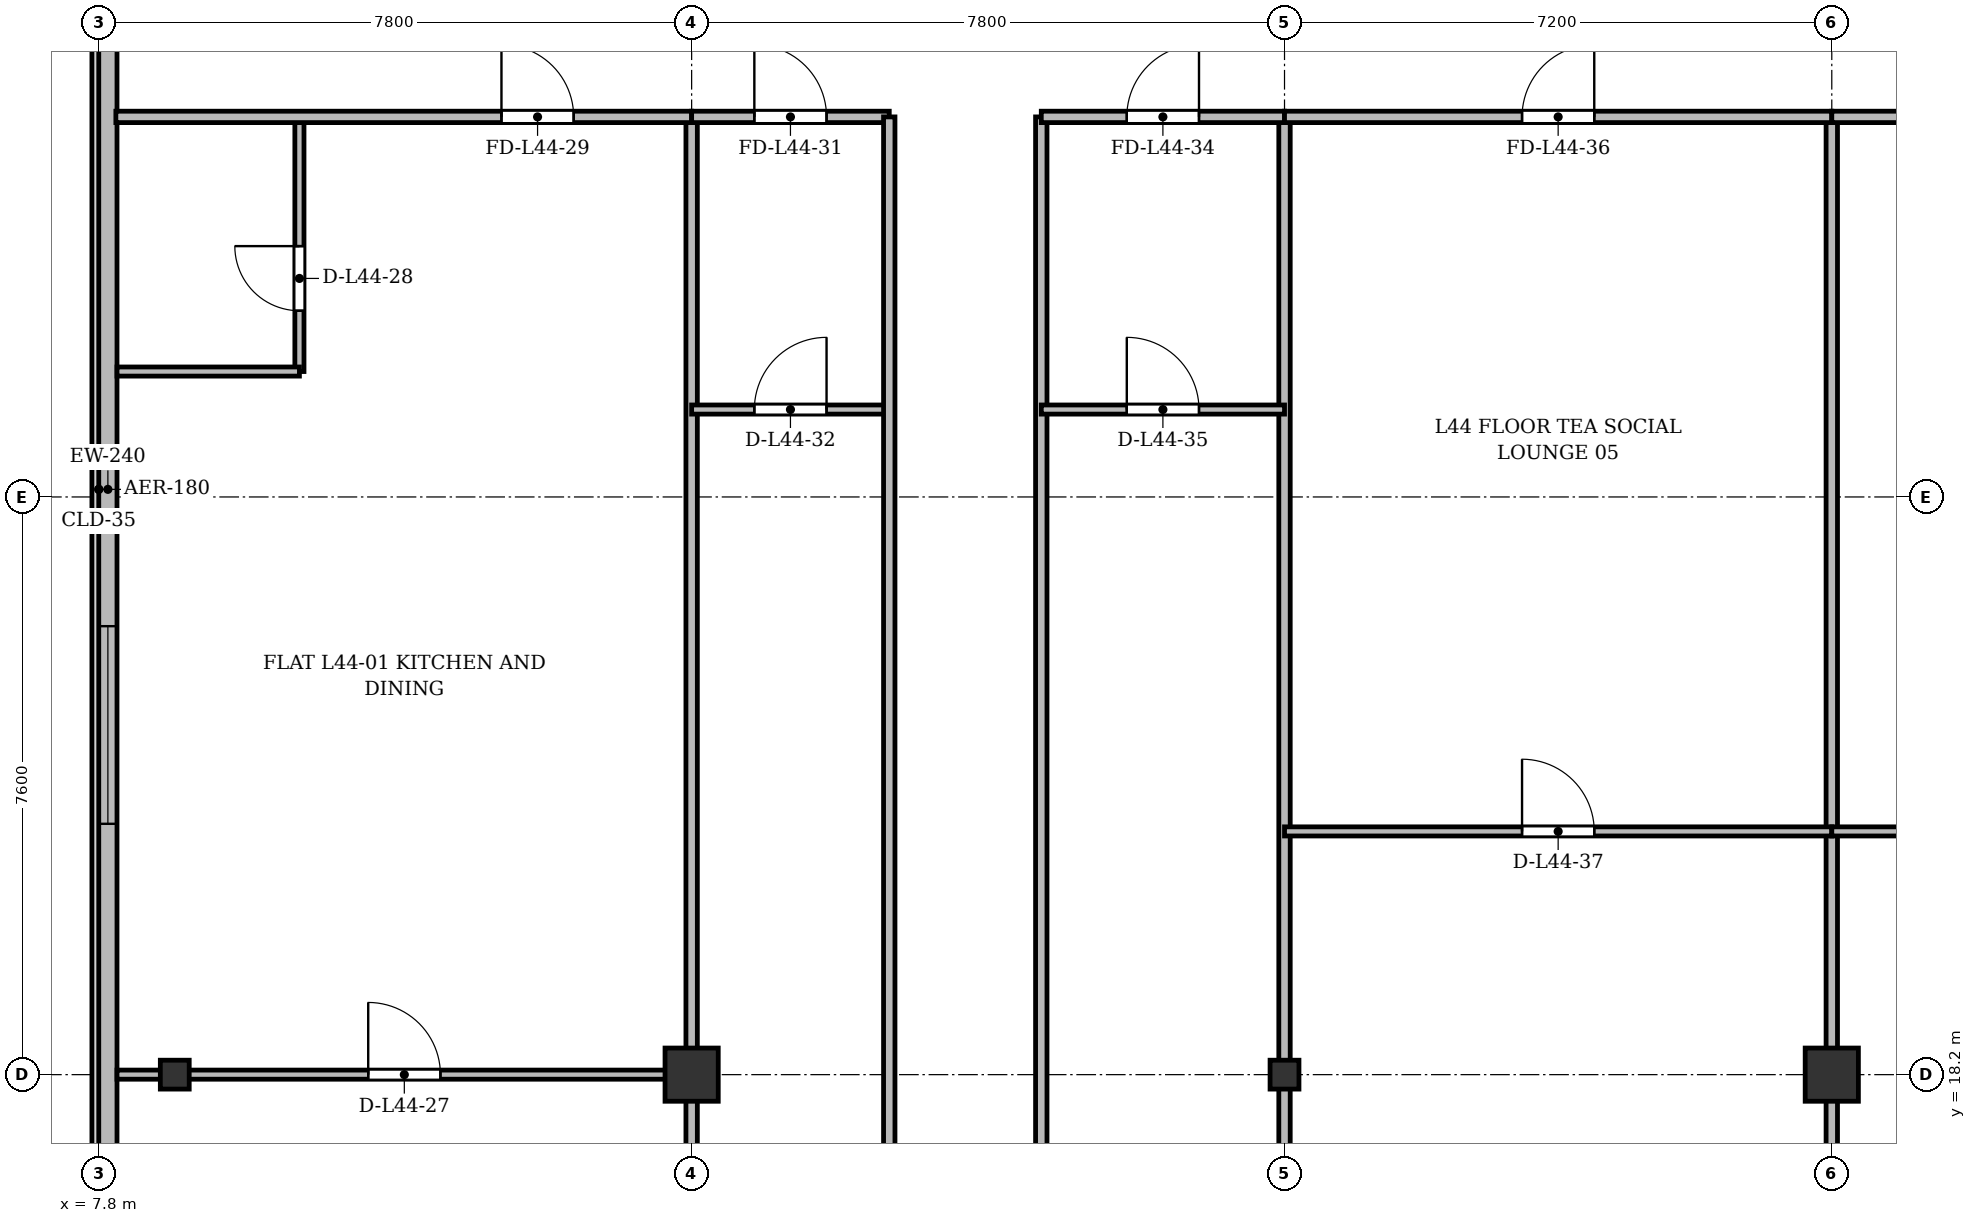
"""IFC4 building model, lengths in metres.
Left out: names, types, materials, properties, quantities, classifications, styles, units other than length and angle.
Written with IfcOpenShell. Run it as: python <this file> out.ifc"""

import sys

from ifc_helpers import new_model, si_unit, direction, frame, frame_2d, origin, origin_2d, place, context, subcontext, project, spatial, rectangle, i_section, extrude, source, transform, mapped, element, fill, save


model = new_model("IFC4")
c1 = context("Model", 3, precision=1e-05, world=origin(), true_north=direction((0.0, 1.0)))
c2 = subcontext(c1, "Body", "Model", "MODEL_VIEW")
j1 = project(units=[si_unit("LENGTHUNIT", "METRE"), si_unit("PLANEANGLEUNIT", "RADIAN")], contexts=[c1])
p1 = place(None, origin())
s1 = spatial("IfcSite", under=j1, at=p1, CompositionType="ELEMENT")
p2 = place(p1, origin())
s2 = spatial("IfcBuilding", under=s1, at=p2, CompositionType="ELEMENT")
p3 = place(p2, frame((0.0, 0.0, 168.1)))
s3 = spatial("IfcBuildingStorey", under=s2, at=p3, CompositionType="ELEMENT", Elevation=168.1)
m1 = source(origin(), c2, "Body", "SweptSolid", [
    extrude(i_section(OverallWidth=0.38, OverallDepth=0.38, WebThickness=0.02, FlangeThickness=0.03, at=origin_2d()), origin(), (0.0, 0.0, 1.0), 3.6),
])
p4 = place(p3, frame((8.8, 18.2, 0.0), z_axis=(0.0, 0.0, 1.0), x_axis=(1.0, 0.0, 0.0)))
e1 = element("IfcColumn", 1, at=p4, inside=s3, PredefinedType="COLUMN", context=c2, shape_type="MappedRepresentation", body=[
    mapped(m1, transform((0.0, 0.0, 0.0), x_axis=(1.0, 0.0, 0.0), y_axis=(0.0, 1.0, 0.0), z_axis=(0.0, 0.0, 1.0), scale=1.0)),
])
m2 = source(origin(), c2, "Body", "SweptSolid", [
    extrude(rectangle(XDim=0.7, YDim=0.7, at=origin_2d()), origin(), (0.0, 0.0, 1.0), 3.6),
])
p5 = place(p3, frame((15.6, 18.2, 0.0), z_axis=(0.0, 0.0, 1.0), x_axis=(1.0, 0.0, 0.0)))
e2 = element("IfcColumn", 2, at=p5, inside=s3, PredefinedType="COLUMN", context=c2, shape_type="MappedRepresentation", body=[
    mapped(m2, transform((0.0, 0.0, 0.0), x_axis=(1.0, 0.0, 0.0), y_axis=(0.0, 1.0, 0.0), z_axis=(0.0, 0.0, 1.0), scale=1.0)),
])
p6 = place(p3, frame((23.4, 18.2, 0.0), z_axis=(0.0, 0.0, 1.0), x_axis=(1.0, 0.0, 0.0)))
e3 = element("IfcColumn", 3, at=p6, inside=s3, PredefinedType="COLUMN", context=c2, shape_type="MappedRepresentation", body=[
    mapped(m1, transform((0.0, 0.0, 0.0), x_axis=(1.0, 0.0, 0.0), y_axis=(0.0, 1.0, 0.0), z_axis=(0.0, 0.0, 1.0), scale=1.0)),
])
p7 = place(p3, frame((30.6, 18.2, 0.0), z_axis=(0.0, 0.0, 1.0), x_axis=(1.0, 0.0, 0.0)))
e4 = element("IfcColumn", 4, at=p7, inside=s3, PredefinedType="COLUMN", context=c2, shape_type="MappedRepresentation", body=[
    mapped(m2, transform((0.0, 0.0, 0.0), x_axis=(1.0, 0.0, 0.0), y_axis=(0.0, 1.0, 0.0), z_axis=(0.0, 0.0, 1.0), scale=1.0)),
])
p8 = place(p3, frame((7.92, 6.3, 0.0), z_axis=(0.0, 0.0, 1.0), x_axis=(0.0, 1.0, 0.0)))
e5 = element("IfcWall", 5, at=p8, inside=s3, PredefinedType="SOLIDWALL", context=c2, shape_type="SweptSolid", body=[
    extrude(rectangle(XDim=39.2, YDim=0.24, at=frame_2d((19.6, 0.0))), origin(), (0.0, 0.0, 1.0), 3.35),
])
p9 = place(p8, frame((1.45, 0.0, 0.92)))
e6 = element("IfcOpeningElement", 6, at=p9, cuts=e5, PredefinedType="OPENING", context=c2, shape_type="SweptSolid", body=[
    extrude(rectangle(XDim=1.2, YDim=1.65, at=frame_2d((0.6, 0.825))), frame((0.0, 0.13, 0.0), z_axis=(0.0, -1.0, 0.0), x_axis=(1.0, 0.0, 0.0)), (0.0, 0.0, 1.0), 0.26),
])
p10 = place(p8, frame((3.8, 0.0, 0.92)))
e7 = element("IfcOpeningElement", 7, at=p10, cuts=e5, PredefinedType="OPENING", context=c2, shape_type="SweptSolid", body=[
    extrude(rectangle(XDim=2.6, YDim=1.9, at=frame_2d((1.3, 0.95))), frame((0.0, 0.13, 0.0), z_axis=(0.0, -1.0, 0.0), x_axis=(1.0, 0.0, 0.0)), (0.0, 0.0, 1.0), 0.26),
])
p11 = place(p8, frame((8.0, 0.0, 0.92)))
e8 = element("IfcOpeningElement", 8, at=p11, cuts=e5, PredefinedType="OPENING", context=c2, shape_type="SweptSolid", body=[
    extrude(rectangle(XDim=2.6, YDim=1.9, at=frame_2d((1.3, 0.95))), frame((0.0, 0.13, 0.0), z_axis=(0.0, -1.0, 0.0), x_axis=(1.0, 0.0, 0.0)), (0.0, 0.0, 1.0), 0.26),
])
p12 = place(p8, frame((15.2, 0.0, 0.92)))
e9 = element("IfcOpeningElement", 9, at=p12, cuts=e5, PredefinedType="OPENING", context=c2, shape_type="SweptSolid", body=[
    extrude(rectangle(XDim=2.6, YDim=1.9, at=frame_2d((1.3, 0.95))), frame((0.0, 0.13, 0.0), z_axis=(0.0, -1.0, 0.0), x_axis=(1.0, 0.0, 0.0)), (0.0, 0.0, 1.0), 0.26),
])
p13 = place(p8, frame((29.2, 0.0, 0.92)))
e10 = element("IfcOpeningElement", 10, at=p13, cuts=e5, PredefinedType="OPENING", context=c2, shape_type="SweptSolid", body=[
    extrude(rectangle(XDim=2.6, YDim=1.9, at=frame_2d((1.3, 0.95))), frame((0.0, 0.13, 0.0), z_axis=(0.0, -1.0, 0.0), x_axis=(1.0, 0.0, 0.0)), (0.0, 0.0, 1.0), 0.26),
])
p14 = place(p8, frame((36.85, 0.0, 0.92)))
e11 = element("IfcOpeningElement", 11, at=p14, cuts=e5, PredefinedType="OPENING", context=c2, shape_type="SweptSolid", body=[
    extrude(rectangle(XDim=1.2, YDim=1.65, at=frame_2d((0.6, 0.825))), frame((0.0, 0.13, 0.0), z_axis=(0.0, -1.0, 0.0), x_axis=(1.0, 0.0, 0.0)), (0.0, 0.0, 1.0), 0.26),
])
for number, where, z_axis, x_axis in (
    (12, (15.6, 3.525, 0.0), (0.0, 0.0, 1.0), (0.0, 1.0, 0.0)),
    (13, (23.4, 3.525, 0.0), (0.0, 0.0, 1.0), (0.0, 1.0, 0.0)),
    (14, (30.6, 3.525, 0.0), (0.0, 0.0, 1.0), (0.0, 1.0, 0.0)),
):
    element("IfcWall", number, at=place(p3, frame(where, z_axis=z_axis, x_axis=x_axis)), inside=s3, PredefinedType="PARTITIONING", context=c2, shape_type="SweptSolid", body=[
        extrude(rectangle(XDim=27.275, YDim=0.15, at=frame_2d((13.638, 0.0))), origin(), (0.0, 0.0, 1.0), 2.85),
    ])
p15 = place(p3, frame((8.04, 18.2, 0.0), z_axis=(0.0, 0.0, 1.0), x_axis=(1.0, 0.0, 0.0)))
e15 = element("IfcWall", 15, at=p15, inside=s3, PredefinedType="PARTITIONING", context=c2, shape_type="SweptSolid", body=[
    extrude(rectangle(XDim=7.56, YDim=0.12, at=frame_2d((3.78, 0.0))), origin(), (0.0, 0.0, 1.0), 2.75),
])
p16 = place(p15, frame((3.305, 0.0, 0.0)))
e16 = element("IfcOpeningElement", 16, at=p16, cuts=e15, PredefinedType="OPENING", context=c2, shape_type="SweptSolid", body=[
    extrude(rectangle(XDim=0.95, YDim=2.15, at=frame_2d((0.475, 1.075))), frame((0.0, 0.07, 0.0), z_axis=(0.0, -1.0, 0.0), x_axis=(1.0, 0.0, 0.0)), (0.0, 0.0, 1.0), 0.14),
])
p17 = place(p3, frame((10.44, 27.45, 0.0), z_axis=(0.0, 0.0, 1.0), x_axis=(0.0, 1.0, 0.0)))
e17 = element("IfcWall", 17, at=p17, inside=s3, PredefinedType="PARTITIONING", context=c2, shape_type="SweptSolid", body=[
    extrude(rectangle(XDim=3.35, YDim=0.12, at=frame_2d((1.675, 0.0))), origin(), (0.0, 0.0, 1.0), 3.35),
])
p18 = place(p17, frame((0.8, 0.0, 0.0)))
e18 = element("IfcOpeningElement", 18, at=p18, cuts=e17, PredefinedType="OPENING", context=c2, shape_type="SweptSolid", body=[
    extrude(rectangle(XDim=0.85, YDim=2.1, at=frame_2d((0.425, 1.05))), frame((0.0, 0.07, 0.0), z_axis=(0.0, -1.0, 0.0), x_axis=(1.0, 0.0, 0.0)), (0.0, 0.0, 1.0), 0.14),
])
p19 = place(p3, frame((8.04, 27.45, 0.0), z_axis=(0.0, 0.0, 1.0), x_axis=(1.0, 0.0, 0.0)))
e19 = element("IfcWall", 19, at=p19, inside=s3, PredefinedType="PARTITIONING", context=c2, shape_type="SweptSolid", body=[
    extrude(rectangle(XDim=2.4, YDim=0.12, at=frame_2d((1.2, 0.0))), origin(), (0.0, 0.0, 1.0), 2.85),
])
p20 = place(p3, frame((8.025, 30.8, 0.0), z_axis=(0.0, 0.0, 1.0), x_axis=(1.0, 0.0, 0.0)))
e20 = element("IfcWall", 20, at=p20, inside=s3, PredefinedType="PARTITIONING", context=c2, shape_type="SweptSolid", body=[
    extrude(rectangle(XDim=7.575, YDim=0.15, at=frame_2d((3.788, 0.0))), origin(), (0.0, 0.0, 1.0), 2.85),
])
p21 = place(p20, frame((5.073, 0.0, 0.0)))
e21 = element("IfcOpeningElement", 21, at=p21, cuts=e20, PredefinedType="OPENING", context=c2, shape_type="SweptSolid", body=[
    extrude(rectangle(XDim=0.95, YDim=2.15, at=frame_2d((0.475, 1.075))), frame((0.0, 0.085, 0.0), z_axis=(0.0, -1.0, 0.0), x_axis=(1.0, 0.0, 0.0)), (0.0, 0.0, 1.0), 0.17),
])
p22 = place(p3, frame((15.6, 30.8, 0.0), z_axis=(0.0, 0.0, 1.0), x_axis=(1.0, 0.0, 0.0)))
e22 = element("IfcWall", 22, at=p22, inside=s3, PredefinedType="PARTITIONING", context=c2, shape_type="SweptSolid", body=[
    extrude(rectangle(XDim=2.6, YDim=0.15, at=frame_2d((1.3, 0.0))), origin(), (0.0, 0.0, 1.0), 2.85),
])
p23 = place(p22, frame((0.825, 0.0, 0.0)))
e23 = element("IfcOpeningElement", 23, at=p23, cuts=e22, PredefinedType="OPENING", context=c2, shape_type="SweptSolid", body=[
    extrude(rectangle(XDim=0.95, YDim=2.15, at=frame_2d((0.475, 1.075))), frame((0.0, 0.085, 0.0), z_axis=(0.0, -1.0, 0.0), x_axis=(1.0, 0.0, 0.0)), (0.0, 0.0, 1.0), 0.17),
])
p24 = place(p3, frame((15.6, 26.95, 0.0), z_axis=(0.0, 0.0, 1.0), x_axis=(1.0, 0.0, 0.0)))
e24 = element("IfcWall", 24, at=p24, inside=s3, PredefinedType="PARTITIONING", context=c2, shape_type="SweptSolid", body=[
    extrude(rectangle(XDim=2.6, YDim=0.12, at=frame_2d((1.3, 0.0))), origin(), (0.0, 0.0, 1.0), 2.85),
])
p25 = place(p24, frame((0.825, 0.0, 0.0)))
e25 = element("IfcOpeningElement", 25, at=p25, cuts=e24, PredefinedType="OPENING", context=c2, shape_type="SweptSolid", body=[
    extrude(rectangle(XDim=0.95, YDim=2.15, at=frame_2d((0.475, 1.075))), frame((0.0, 0.07, 0.0), z_axis=(0.0, -1.0, 0.0), x_axis=(1.0, 0.0, 0.0)), (0.0, 0.0, 1.0), 0.14),
])
for number, where, z_axis, x_axis in (
    (26, (18.2, 3.525, 0.0), (0.0, 0.0, 1.0), (0.0, 1.0, 0.0)),
    (27, (20.2, 3.525, 0.0), (0.0, 0.0, 1.0), (0.0, 1.0, 0.0)),
):
    element("IfcWall", number, at=place(p3, frame(where, z_axis=z_axis, x_axis=x_axis)), inside=s3, PredefinedType="PARTITIONING", context=c2, shape_type="SweptSolid", body=[
        extrude(rectangle(XDim=27.275, YDim=0.15, at=frame_2d((13.638, 0.0))), origin(), (0.0, 0.0, 1.0), 2.75),
    ])
p26 = place(p3, frame((20.2, 30.8, 0.0), z_axis=(0.0, 0.0, 1.0), x_axis=(1.0, 0.0, 0.0)))
e28 = element("IfcWall", 28, at=p26, inside=s3, PredefinedType="PARTITIONING", context=c2, shape_type="SweptSolid", body=[
    extrude(rectangle(XDim=3.2, YDim=0.15, at=frame_2d((1.6, 0.0))), origin(), (0.0, 0.0, 1.0), 2.85),
])
p27 = place(p26, frame((1.125, 0.0, 0.0)))
e29 = element("IfcOpeningElement", 29, at=p27, cuts=e28, PredefinedType="OPENING", context=c2, shape_type="SweptSolid", body=[
    extrude(rectangle(XDim=0.95, YDim=2.15, at=frame_2d((0.475, 1.075))), frame((0.0, 0.085, 0.0), z_axis=(0.0, -1.0, 0.0), x_axis=(1.0, 0.0, 0.0)), (0.0, 0.0, 1.0), 0.17),
])
p28 = place(p3, frame((20.2, 26.95, 0.0), z_axis=(0.0, 0.0, 1.0), x_axis=(1.0, 0.0, 0.0)))
e30 = element("IfcWall", 30, at=p28, inside=s3, PredefinedType="PARTITIONING", context=c2, shape_type="SweptSolid", body=[
    extrude(rectangle(XDim=3.2, YDim=0.12, at=frame_2d((1.6, 0.0))), origin(), (0.0, 0.0, 1.0), 2.85),
])
p29 = place(p28, frame((1.125, 0.0, 0.0)))
e31 = element("IfcOpeningElement", 31, at=p29, cuts=e30, PredefinedType="OPENING", context=c2, shape_type="SweptSolid", body=[
    extrude(rectangle(XDim=0.95, YDim=2.15, at=frame_2d((0.475, 1.075))), frame((0.0, 0.07, 0.0), z_axis=(0.0, -1.0, 0.0), x_axis=(1.0, 0.0, 0.0)), (0.0, 0.0, 1.0), 0.14),
])
p30 = place(p3, frame((23.4, 30.8, 0.0), z_axis=(0.0, 0.0, 1.0), x_axis=(1.0, 0.0, 0.0)))
e32 = element("IfcWall", 32, at=p30, inside=s3, PredefinedType="PARTITIONING", context=c2, shape_type="SweptSolid", body=[
    extrude(rectangle(XDim=7.2, YDim=0.15, at=frame_2d((3.6, 0.0))), origin(), (0.0, 0.0, 1.0), 2.85),
])
p31 = place(p30, frame((3.125, 0.0, 0.0)))
e33 = element("IfcOpeningElement", 33, at=p31, cuts=e32, PredefinedType="OPENING", context=c2, shape_type="SweptSolid", body=[
    extrude(rectangle(XDim=0.95, YDim=2.15, at=frame_2d((0.475, 1.075))), frame((0.0, 0.085, 0.0), z_axis=(0.0, -1.0, 0.0), x_axis=(1.0, 0.0, 0.0)), (0.0, 0.0, 1.0), 0.17),
])
p32 = place(p3, frame((23.4, 21.4, 0.0), z_axis=(0.0, 0.0, 1.0), x_axis=(1.0, 0.0, 0.0)))
e34 = element("IfcWall", 34, at=p32, inside=s3, PredefinedType="PARTITIONING", context=c2, shape_type="SweptSolid", body=[
    extrude(rectangle(XDim=7.2, YDim=0.12, at=frame_2d((3.6, 0.0))), origin(), (0.0, 0.0, 1.0), 2.85),
])
p33 = place(p32, frame((3.125, 0.0, 0.0)))
e35 = element("IfcOpeningElement", 35, at=p33, cuts=e34, PredefinedType="OPENING", context=c2, shape_type="SweptSolid", body=[
    extrude(rectangle(XDim=0.95, YDim=2.15, at=frame_2d((0.475, 1.075))), frame((0.0, 0.07, 0.0), z_axis=(0.0, -1.0, 0.0), x_axis=(1.0, 0.0, 0.0)), (0.0, 0.0, 1.0), 0.14),
])
p34 = place(p3, frame((30.6, 30.8, 0.0), z_axis=(0.0, 0.0, 1.0), x_axis=(1.0, 0.0, 0.0)))
e36 = element("IfcWall", 36, at=p34, inside=s3, PredefinedType="PARTITIONING", context=c2, shape_type="SweptSolid", body=[
    extrude(rectangle(XDim=6.6, YDim=0.15, at=frame_2d((3.3, 0.0))), origin(), (0.0, 0.0, 1.0), 2.85),
])
p35 = place(p34, frame((2.734, 0.0, 0.0)))
e37 = element("IfcOpeningElement", 37, at=p35, cuts=e36, PredefinedType="OPENING", context=c2, shape_type="SweptSolid", body=[
    extrude(rectangle(XDim=0.95, YDim=2.15, at=frame_2d((0.475, 1.075))), frame((0.0, 0.085, 0.0), z_axis=(0.0, -1.0, 0.0), x_axis=(1.0, 0.0, 0.0)), (0.0, 0.0, 1.0), 0.17),
])
p36 = place(p3, frame((30.6, 21.4, 0.0), z_axis=(0.0, 0.0, 1.0), x_axis=(1.0, 0.0, 0.0)))
e38 = element("IfcWall", 38, at=p36, inside=s3, PredefinedType="PARTITIONING", context=c2, shape_type="SweptSolid", body=[
    extrude(rectangle(XDim=6.6, YDim=0.12, at=frame_2d((3.3, 0.0))), origin(), (0.0, 0.0, 1.0), 2.85),
])
p37 = place(p36, frame((2.734, 0.0, 0.0)))
e39 = element("IfcOpeningElement", 39, at=p37, cuts=e38, PredefinedType="OPENING", context=c2, shape_type="SweptSolid", body=[
    extrude(rectangle(XDim=0.95, YDim=2.15, at=frame_2d((0.475, 1.075))), frame((0.0, 0.07, 0.0), z_axis=(0.0, -1.0, 0.0), x_axis=(1.0, 0.0, 0.0)), (0.0, 0.0, 1.0), 0.14),
])
m3 = source(origin(), c2, "Body", "SweptSolid", [
    extrude(rectangle(XDim=2.6, YDim=1.9, at=frame_2d((1.3, 0.95))), frame((0.0, 0.03, 0.0), z_axis=(0.0, -1.0, 0.0), x_axis=(1.0, 0.0, 0.0)), (0.0, 0.0, 1.0), 0.06),
])
p38 = place(p12, origin())
e40 = element("IfcWindow", 40, at=p38, inside=s3, PartitioningType="SINGLE_PANEL", PredefinedType="WINDOW", context=c2, shape_type="MappedRepresentation", body=[
    mapped(m3, transform((0.0, 0.0, 0.0), x_axis=(1.0, 0.0, 0.0), y_axis=(0.0, 1.0, 0.0), z_axis=(0.0, 0.0, 1.0), scale=1.0)),
])
fill(e9, e40)
m4 = source(origin(), c2, "Body", "SweptSolid", [
    extrude(rectangle(XDim=0.95, YDim=2.15, at=frame_2d((0.475, 1.075))), frame((0.0, 0.025, 0.0), z_axis=(0.0, -1.0, 0.0), x_axis=(1.0, 0.0, 0.0)), (0.0, 0.0, 1.0), 0.05),
])
p39 = place(p16, origin())
e41 = element("IfcDoor", 41, at=p39, inside=s3, OperationType="SINGLE_SWING_LEFT", PredefinedType="DOOR", context=c2, shape_type="MappedRepresentation", body=[
    mapped(m4, transform((0.0, 0.0, 0.0), x_axis=(1.0, 0.0, 0.0), y_axis=(0.0, 1.0, 0.0), z_axis=(0.0, 0.0, 1.0), scale=1.0)),
])
fill(e16, e41)
m5 = source(origin(), c2, "Body", "SweptSolid", [
    extrude(rectangle(XDim=0.85, YDim=2.1, at=frame_2d((0.425, 1.05))), frame((0.0, 0.025, 0.0), z_axis=(0.0, -1.0, 0.0), x_axis=(1.0, 0.0, 0.0)), (0.0, 0.0, 1.0), 0.05),
])
p40 = place(p18, origin())
e42 = element("IfcDoor", 42, at=p40, inside=s3, OperationType="SINGLE_SWING_RIGHT", PredefinedType="DOOR", context=c2, shape_type="MappedRepresentation", body=[
    mapped(m5, transform((0.0, 0.0, 0.0), x_axis=(1.0, 0.0, 0.0), y_axis=(0.0, 1.0, 0.0), z_axis=(0.0, 0.0, 1.0), scale=1.0)),
])
fill(e18, e42)
p41 = place(p21, origin())
e43 = element("IfcDoor", 43, at=p41, inside=s3, OperationType="SINGLE_SWING_LEFT", PredefinedType="DOOR", context=c2, shape_type="MappedRepresentation", body=[
    mapped(m4, transform((0.0, 0.0, 0.0), x_axis=(1.0, 0.0, 0.0), y_axis=(0.0, 1.0, 0.0), z_axis=(0.0, 0.0, 1.0), scale=1.0)),
])
fill(e21, e43)
p42 = place(p23, origin())
e44 = element("IfcDoor", 44, at=p42, inside=s3, OperationType="SINGLE_SWING_LEFT", PredefinedType="DOOR", context=c2, shape_type="MappedRepresentation", body=[
    mapped(m4, transform((0.0, 0.0, 0.0), x_axis=(1.0, 0.0, 0.0), y_axis=(0.0, 1.0, 0.0), z_axis=(0.0, 0.0, 1.0), scale=1.0)),
])
fill(e23, e44)
p43 = place(p25, origin())
e45 = element("IfcDoor", 45, at=p43, inside=s3, OperationType="SINGLE_SWING_RIGHT", PredefinedType="DOOR", context=c2, shape_type="MappedRepresentation", body=[
    mapped(m4, transform((0.0, 0.0, 0.0), x_axis=(1.0, 0.0, 0.0), y_axis=(0.0, 1.0, 0.0), z_axis=(0.0, 0.0, 1.0), scale=1.0)),
])
fill(e25, e45)
p44 = place(p27, origin())
e46 = element("IfcDoor", 46, at=p44, inside=s3, OperationType="SINGLE_SWING_RIGHT", PredefinedType="DOOR", context=c2, shape_type="MappedRepresentation", body=[
    mapped(m4, transform((0.0, 0.0, 0.0), x_axis=(1.0, 0.0, 0.0), y_axis=(0.0, 1.0, 0.0), z_axis=(0.0, 0.0, 1.0), scale=1.0)),
])
fill(e29, e46)
p45 = place(p29, origin())
e47 = element("IfcDoor", 47, at=p45, inside=s3, OperationType="SINGLE_SWING_LEFT", PredefinedType="DOOR", context=c2, shape_type="MappedRepresentation", body=[
    mapped(m4, transform((0.0, 0.0, 0.0), x_axis=(1.0, 0.0, 0.0), y_axis=(0.0, 1.0, 0.0), z_axis=(0.0, 0.0, 1.0), scale=1.0)),
])
fill(e31, e47)
p46 = place(p31, origin())
e48 = element("IfcDoor", 48, at=p46, inside=s3, OperationType="SINGLE_SWING_RIGHT", PredefinedType="DOOR", context=c2, shape_type="MappedRepresentation", body=[
    mapped(m4, transform((0.0, 0.0, 0.0), x_axis=(1.0, 0.0, 0.0), y_axis=(0.0, 1.0, 0.0), z_axis=(0.0, 0.0, 1.0), scale=1.0)),
])
fill(e33, e48)
p47 = place(p33, origin())
e49 = element("IfcDoor", 49, at=p47, inside=s3, OperationType="SINGLE_SWING_LEFT", PredefinedType="DOOR", context=c2, shape_type="MappedRepresentation", body=[
    mapped(m4, transform((0.0, 0.0, 0.0), x_axis=(1.0, 0.0, 0.0), y_axis=(0.0, 1.0, 0.0), z_axis=(0.0, 0.0, 1.0), scale=1.0)),
])
fill(e35, e49)
save(model, sys.argv[1])
